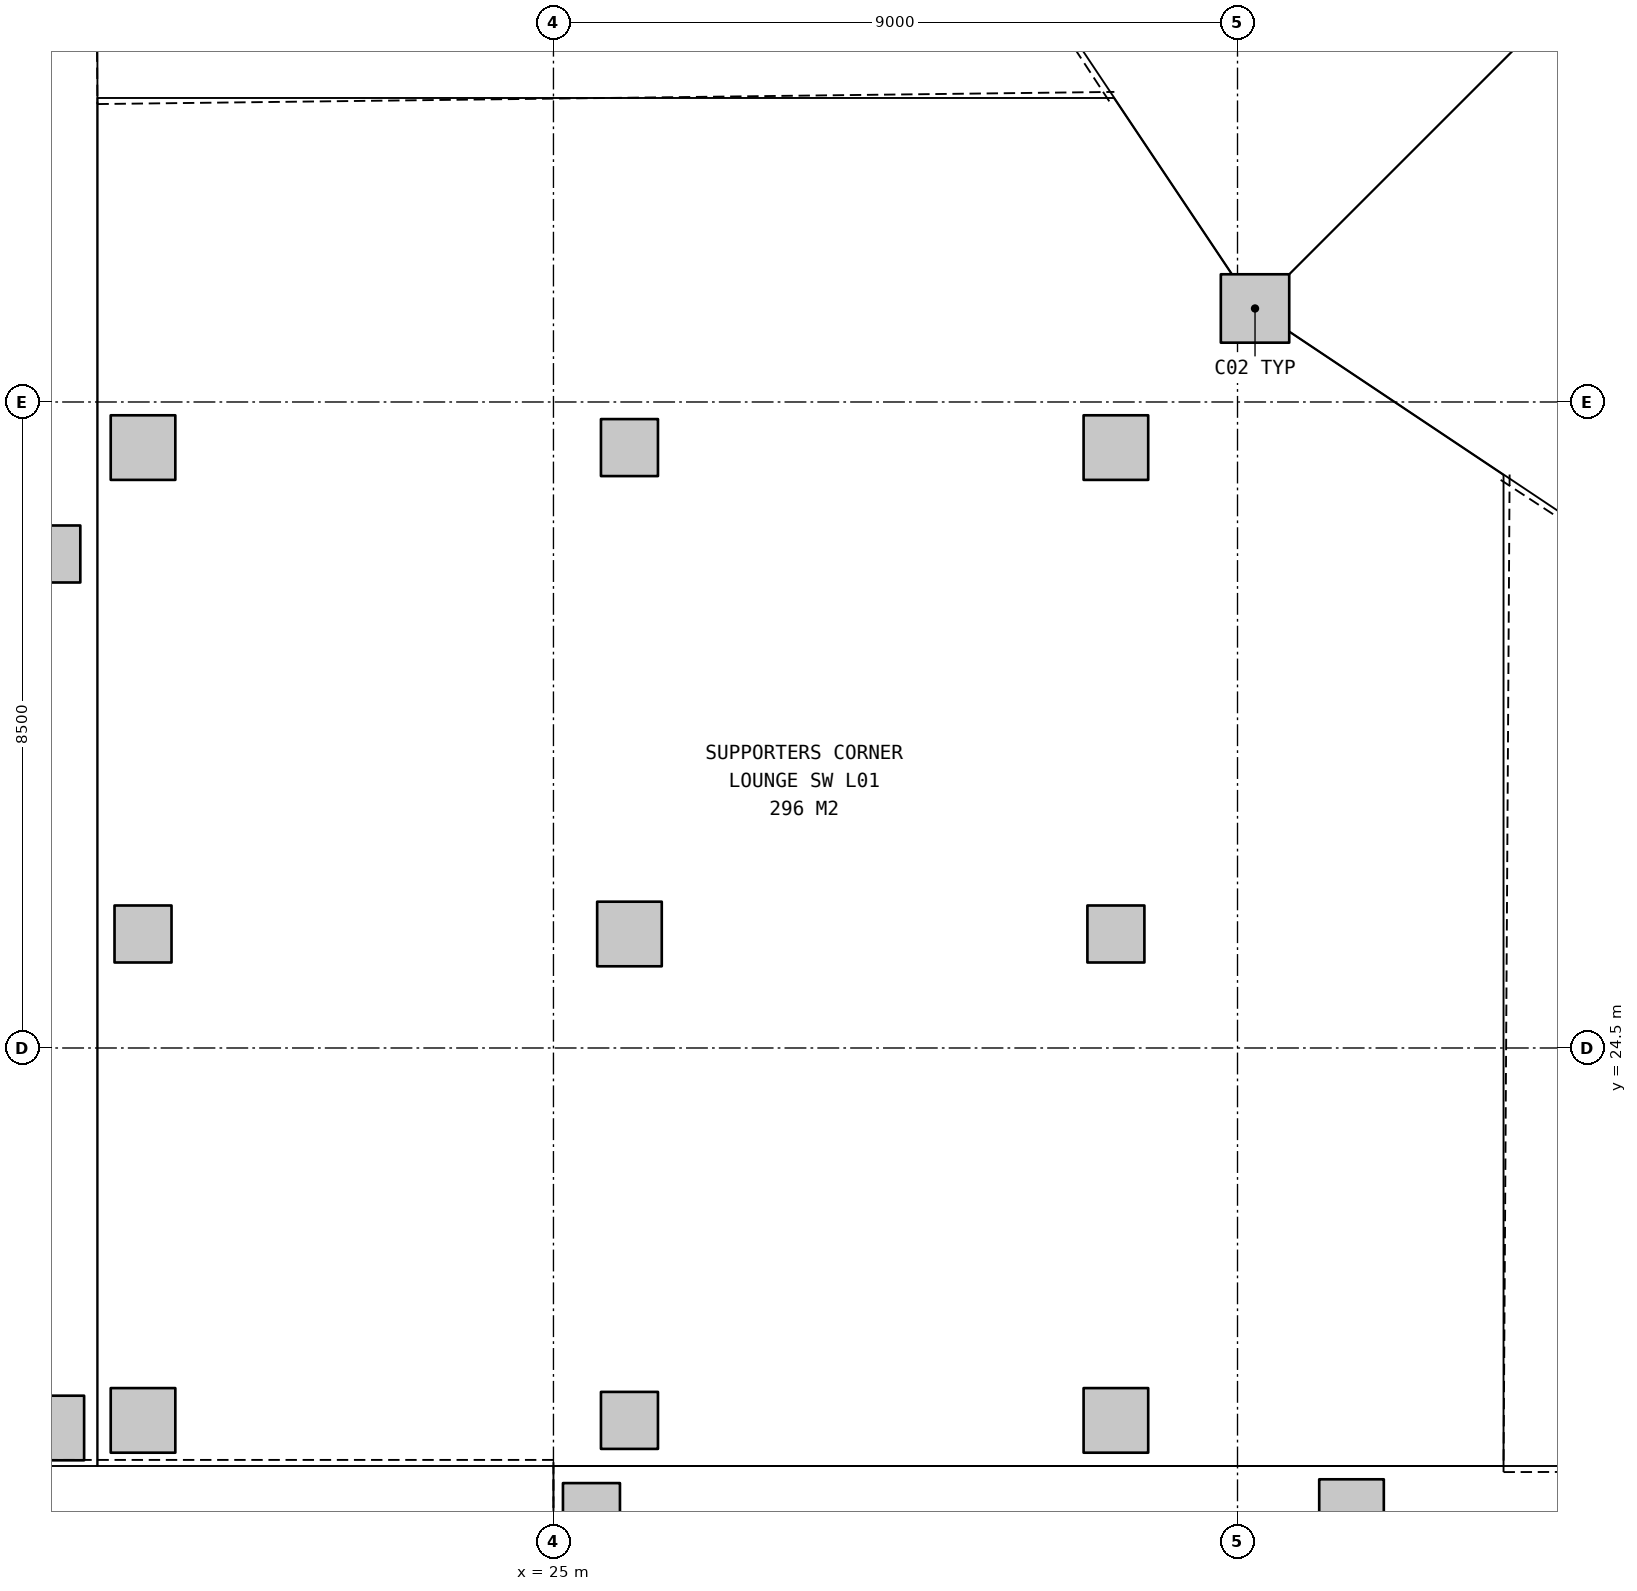
"""IFC4 building model, lengths in metres.
Left out: names, types, materials, properties, quantities, classifications, styles, units other than length and angle.
Written with IfcOpenShell. Run it as: python <this file> out.ifc"""

import sys

from ifc_helpers import new_model, si_unit, direction, frame, origin, origin_2d, place, context, subcontext, project, spatial, rectangle, extrude, element, save


model = new_model("IFC4")
c1 = context("Model", 3, precision=1e-05, world=origin(), true_north=direction((0.0, 1.0)))
c2 = subcontext(c1, "Body", "Model", "MODEL_VIEW")
j1 = project(units=[si_unit("LENGTHUNIT", "METRE"), si_unit("PLANEANGLEUNIT", "RADIAN")], contexts=[c1])
p1 = place(None, origin())
s1 = spatial("IfcSite", under=j1, at=p1, CompositionType="ELEMENT")
p2 = place(p1, origin())
s2 = spatial("IfcBuilding", under=s1, at=p2, CompositionType="ELEMENT")
p3 = place(p2, frame((0.0, 0.0, 5.4)))
s3 = spatial("IfcBuildingStorey", under=s2, at=p3, CompositionType="ELEMENT", Elevation=5.4)
p4 = place(p3, frame((34.23, 34.23, 0.0), z_axis=(0.0, 0.0, 1.0), x_axis=(1.0, 0.0, 0.0)))
e1 = element("IfcColumn", 1, at=p4, inside=s3, PredefinedType="COLUMN", context=c2, shape_type="SweptSolid", body=[
    extrude(rectangle(XDim=0.9, YDim=0.9, at=origin_2d()), origin(), (0.0, 0.0, 1.0), 5.4),
])
p5 = place(p3, frame((18.4, 19.5, 0.0), z_axis=(0.0, 0.0, 1.0), x_axis=(1.0, 0.0, 0.0)))
e2 = element("IfcColumn", 2, at=p5, inside=s3, PredefinedType="COLUMN", context=c2, shape_type="SweptSolid", body=[
    extrude(rectangle(XDim=0.85, YDim=0.85, at=origin_2d()), origin(), (0.0, 0.0, 1.0), 5.4),
])
for number, where, z_axis, x_axis in (
    (3, (18.4, 31.0, 0.0), (0.0, 0.0, 1.0), (1.0, 0.0, 0.0)),
    (4, (25.5, 18.4, 0.0), (0.0, 0.0, 1.0), (1.0, 0.0, 0.0)),
):
    element("IfcColumn", number, at=place(p3, frame(where, z_axis=z_axis, x_axis=x_axis)), inside=s3, PredefinedType="COLUMN", context=c2, shape_type="SweptSolid", body=[
        extrude(rectangle(XDim=0.75, YDim=0.75, at=origin_2d()), origin(), (0.0, 0.0, 1.0), 5.4),
    ])
for number, where, z_axis, x_axis in (
    (5, (35.5, 18.4, 0.0), (0.0, 0.0, 1.0), (1.0, 0.0, 0.0)),
    (6, (19.6, 19.6, 0.0), (0.0, 0.0, 1.0), (1.0, 0.0, 0.0)),
):
    element("IfcColumn", number, at=place(p3, frame(where, z_axis=z_axis, x_axis=x_axis)), inside=s3, PredefinedType="COLUMN", context=c2, shape_type="SweptSolid", body=[
        extrude(rectangle(XDim=0.85, YDim=0.85, at=origin_2d()), origin(), (0.0, 0.0, 1.0), 5.4),
    ])
p6 = place(p3, frame((19.6, 26.0, 0.0), z_axis=(0.0, 0.0, 1.0), x_axis=(1.0, 0.0, 0.0)))
e7 = element("IfcColumn", 7, at=p6, inside=s3, PredefinedType="COLUMN", context=c2, shape_type="SweptSolid", body=[
    extrude(rectangle(XDim=0.75, YDim=0.75, at=origin_2d()), origin(), (0.0, 0.0, 1.0), 5.4),
])
p7 = place(p3, frame((19.6, 32.4, 0.0), z_axis=(0.0, 0.0, 1.0), x_axis=(1.0, 0.0, 0.0)))
e8 = element("IfcColumn", 8, at=p7, inside=s3, PredefinedType="COLUMN", context=c2, shape_type="SweptSolid", body=[
    extrude(rectangle(XDim=0.85, YDim=0.85, at=origin_2d()), origin(), (0.0, 0.0, 1.0), 5.4),
])
p8 = place(p3, frame((26.0, 19.6, 0.0), z_axis=(0.0, 0.0, 1.0), x_axis=(1.0, 0.0, 0.0)))
e9 = element("IfcColumn", 9, at=p8, inside=s3, PredefinedType="COLUMN", context=c2, shape_type="SweptSolid", body=[
    extrude(rectangle(XDim=0.75, YDim=0.75, at=origin_2d()), origin(), (0.0, 0.0, 1.0), 5.4),
])
p9 = place(p3, frame((26.0, 26.0, 0.0), z_axis=(0.0, 0.0, 1.0), x_axis=(1.0, 0.0, 0.0)))
e10 = element("IfcColumn", 10, at=p9, inside=s3, PredefinedType="COLUMN", context=c2, shape_type="SweptSolid", body=[
    extrude(rectangle(XDim=0.85, YDim=0.85, at=origin_2d()), origin(), (0.0, 0.0, 1.0), 5.4),
])
p10 = place(p3, frame((26.0, 32.4, 0.0), z_axis=(0.0, 0.0, 1.0), x_axis=(1.0, 0.0, 0.0)))
e11 = element("IfcColumn", 11, at=p10, inside=s3, PredefinedType="COLUMN", context=c2, shape_type="SweptSolid", body=[
    extrude(rectangle(XDim=0.75, YDim=0.75, at=origin_2d()), origin(), (0.0, 0.0, 1.0), 5.4),
])
p11 = place(p3, frame((32.4, 19.6, 0.0), z_axis=(0.0, 0.0, 1.0), x_axis=(1.0, 0.0, 0.0)))
e12 = element("IfcColumn", 12, at=p11, inside=s3, PredefinedType="COLUMN", context=c2, shape_type="SweptSolid", body=[
    extrude(rectangle(XDim=0.85, YDim=0.85, at=origin_2d()), origin(), (0.0, 0.0, 1.0), 5.4),
])
p12 = place(p3, frame((32.4, 26.0, 0.0), z_axis=(0.0, 0.0, 1.0), x_axis=(1.0, 0.0, 0.0)))
e13 = element("IfcColumn", 13, at=p12, inside=s3, PredefinedType="COLUMN", context=c2, shape_type="SweptSolid", body=[
    extrude(rectangle(XDim=0.75, YDim=0.75, at=origin_2d()), origin(), (0.0, 0.0, 1.0), 5.4),
])
p13 = place(p3, frame((32.4, 32.4, 0.0), z_axis=(0.0, 0.0, 1.0), x_axis=(1.0, 0.0, 0.0)))
e14 = element("IfcColumn", 14, at=p13, inside=s3, PredefinedType="COLUMN", context=c2, shape_type="SweptSolid", body=[
    extrude(rectangle(XDim=0.85, YDim=0.85, at=origin_2d()), origin(), (0.0, 0.0, 1.0), 5.4),
])
save(model, sys.argv[1])
